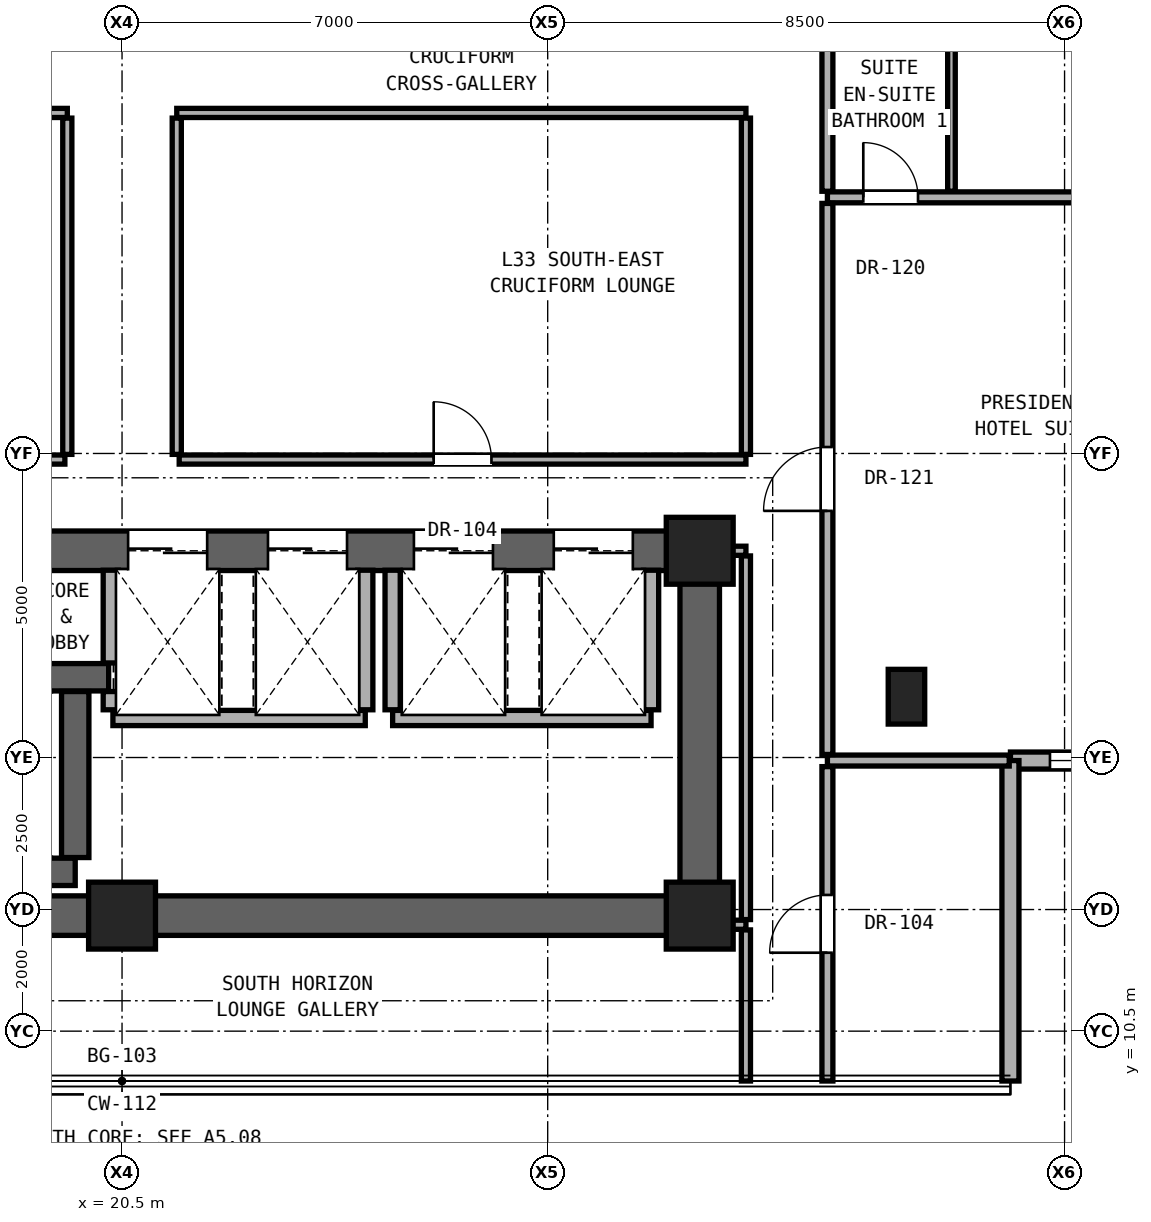
"""IFC4 building model, lengths in metres.
Left out: names, types, materials, properties, quantities, classifications, styles, units other than length and angle.
Written with IfcOpenShell. Run it as: python <this file> out.ifc"""

import sys

from ifc_helpers import new_model, si_unit, direction, frame, frame_2d, origin, origin_2d, place, context, subcontext, project, spatial, rectangle, extrude, element, fill, save


model = new_model("IFC4")
c1 = context("Model", 3, precision=1e-05, world=origin(), true_north=direction((0.0, 1.0)))
c2 = subcontext(c1, "Body", "Model", "MODEL_VIEW")
j1 = project(units=[si_unit("LENGTHUNIT", "METRE"), si_unit("PLANEANGLEUNIT", "RADIAN")], contexts=[c1])
p1 = place(None, origin())
s1 = spatial("IfcSite", under=j1, at=p1, CompositionType="ELEMENT")
p2 = place(p1, origin())
s2 = spatial("IfcBuilding", under=s1, at=p2, CompositionType="ELEMENT")
p3 = place(p2, frame((0.0, 0.0, 118.1)))
s3 = spatial("IfcBuildingStorey", under=s2, at=p3, CompositionType="ELEMENT", Elevation=118.1)
for number, where, z_axis, x_axis in (
    (1, (20.5, 12.4, 0.0), (0.0, 0.0, 1.0), (1.0, 0.0, 0.0)),
    (2, (30.0, 12.4, 0.0), (0.0, 0.0, 1.0), (1.0, 0.0, 0.0)),
    (3, (30.0, 18.4, 0.0), (0.0, 0.0, 1.0), (1.0, 0.0, 0.0)),
):
    element("IfcColumn", number, at=place(p3, frame(where, z_axis=z_axis, x_axis=x_axis)), inside=s3, PredefinedType="COLUMN", context=c2, shape_type="SweptSolid", body=[
        extrude(rectangle(XDim=1.1, YDim=1.1, at=origin_2d()), origin(), (0.0, 0.0, 1.0), 3.3),
    ])
p4 = place(p3, frame((33.4, 16.0, 0.0), z_axis=(0.0, 0.0, 1.0), x_axis=(1.0, 0.0, 0.0)))
e4 = element("IfcColumn", 4, at=p4, inside=s3, PredefinedType="PILASTER", context=c2, shape_type="SweptSolid", body=[
    extrude(rectangle(XDim=0.6, YDim=0.9, at=origin_2d()), origin(), (0.0, 0.0, 1.0), 3.3),
])
p5 = place(p3, frame((11.0, 12.4, 0.0), z_axis=(0.0, 0.0, 1.0), x_axis=(1.0, 0.0, 0.0)))
e5 = element("IfcWall", 5, at=p5, inside=s3, PredefinedType="SHEAR", context=c2, shape_type="SweptSolid", body=[
    extrude(rectangle(XDim=19.0, YDim=0.65, at=frame_2d((9.5, 0.0))), origin(), (0.0, 0.0, 1.0), 3.08),
])
p6 = place(p3, frame((30.0, 12.4, 0.0), z_axis=(0.0, 0.0, 1.0), x_axis=(0.0, 1.0, 0.0)))
e6 = element("IfcWall", 6, at=p6, inside=s3, PredefinedType="SHEAR", context=c2, shape_type="SweptSolid", body=[
    extrude(rectangle(XDim=6.0, YDim=0.65, at=frame_2d((3.0, 0.0))), origin(), (0.0, 0.0, 1.0), 3.08),
])
p7 = place(p3, frame((11.0, 18.4, 0.0), z_axis=(0.0, 0.0, 1.0), x_axis=(1.0, 0.0, 0.0)))
e7 = element("IfcWall", 7, at=p7, inside=s3, PredefinedType="SHEAR", context=c2, shape_type="SweptSolid", body=[
    extrude(rectangle(XDim=19.0, YDim=0.65, at=frame_2d((9.5, 0.0))), origin(), (0.0, 0.0, 1.0), 3.08),
])
p8 = place(p7, frame((4.175, 0.0, 0.0)))
e8 = element("IfcOpeningElement", 8, at=p8, cuts=e7, PredefinedType="OPENING", context=c2, shape_type="SweptSolid", body=[
    extrude(rectangle(XDim=1.2, YDim=2.25, at=frame_2d((0.6, 1.125))), frame((0.0, 0.335, 0.0), z_axis=(0.0, -1.0, 0.0), x_axis=(1.0, 0.0, 0.0)), (0.0, 0.0, 1.0), 0.67),
])
p9 = place(p7, frame((9.6, 0.0, 0.0)))
e9 = element("IfcOpeningElement", 9, at=p9, cuts=e7, PredefinedType="OPENING", context=c2, shape_type="SweptSolid", body=[
    extrude(rectangle(XDim=1.3, YDim=2.3, at=frame_2d((0.65, 1.15))), frame((0.0, 0.335, 0.0), z_axis=(0.0, -1.0, 0.0), x_axis=(1.0, 0.0, 0.0)), (0.0, 0.0, 1.0), 0.67),
])
p10 = place(p7, frame((11.9, 0.0, 0.0)))
e10 = element("IfcOpeningElement", 10, at=p10, cuts=e7, PredefinedType="OPENING", context=c2, shape_type="SweptSolid", body=[
    extrude(rectangle(XDim=1.3, YDim=2.3, at=frame_2d((0.65, 1.15))), frame((0.0, 0.335, 0.0), z_axis=(0.0, -1.0, 0.0), x_axis=(1.0, 0.0, 0.0)), (0.0, 0.0, 1.0), 0.67),
])
p11 = place(p7, frame((14.3, 0.0, 0.0)))
e11 = element("IfcOpeningElement", 11, at=p11, cuts=e7, PredefinedType="OPENING", context=c2, shape_type="SweptSolid", body=[
    extrude(rectangle(XDim=1.3, YDim=2.3, at=frame_2d((0.65, 1.15))), frame((0.0, 0.335, 0.0), z_axis=(0.0, -1.0, 0.0), x_axis=(1.0, 0.0, 0.0)), (0.0, 0.0, 1.0), 0.67),
])
p12 = place(p7, frame((16.6, 0.0, 0.0)))
e12 = element("IfcOpeningElement", 12, at=p12, cuts=e7, PredefinedType="OPENING", context=c2, shape_type="SweptSolid", body=[
    extrude(rectangle(XDim=1.3, YDim=2.3, at=frame_2d((0.65, 1.15))), frame((0.0, 0.335, 0.0), z_axis=(0.0, -1.0, 0.0), x_axis=(1.0, 0.0, 0.0)), (0.0, 0.0, 1.0), 0.67),
])
p13 = place(p3, frame((35.11, 14.95, 0.0), z_axis=(0.0, 0.0, 1.0), x_axis=(1.0, 0.0, 0.0)))
e13 = element("IfcWall", 13, at=p13, inside=s3, PredefinedType="SOLIDWALL", context=c2, shape_type="SweptSolid", body=[
    extrude(rectangle(XDim=5.27, YDim=0.28, at=frame_2d((2.635, 0.0))), origin(), (0.0, 0.0, 1.0), 3.06),
])
p14 = place(p13, frame((0.65, 0.0, 0.85)))
e14 = element("IfcOpeningElement", 14, at=p14, cuts=e13, PredefinedType="OPENING", context=c2, shape_type="SweptSolid", body=[
    extrude(rectangle(XDim=1.1, YDim=2.0, at=frame_2d((0.55, 1.0))), frame((0.0, 0.15, 0.0), z_axis=(0.0, -1.0, 0.0), x_axis=(1.0, 0.0, 0.0)), (0.0, 0.0, 1.0), 0.3),
])
p15 = place(p3, frame((35.11, 9.68, 0.0), z_axis=(0.0, 0.0, 1.0), x_axis=(0.0, 1.0, 0.0)))
e15 = element("IfcWall", 15, at=p15, inside=s3, PredefinedType="SOLIDWALL", context=c2, shape_type="SweptSolid", body=[
    extrude(rectangle(XDim=5.27, YDim=0.28, at=frame_2d((2.635, 0.0))), origin(), (0.0, 0.0, 1.0), 3.06),
])
p16 = place(p3, frame((30.32, 12.25, 0.0), z_axis=(0.0, 0.0, 1.0), x_axis=(1.0, 0.0, 0.0)))
e16 = element("IfcWall", 16, at=p16, inside=s3, PredefinedType="PARTITIONING", context=c2, shape_type="SweptSolid", body=[
    extrude(rectangle(XDim=0.44, YDim=0.15, at=frame_2d((0.22, 0.0))), origin(), (0.0, 0.0, 1.0), 3.08),
])
p17 = place(p3, frame((11.32, 13.12, 0.0), z_axis=(0.0, 0.0, 1.0), x_axis=(1.0, 0.0, 0.0)))
e17 = element("IfcWall", 17, at=p17, inside=s3, PredefinedType="SHEAR", context=c2, shape_type="SweptSolid", body=[
    extrude(rectangle(XDim=8.41, YDim=0.45, at=frame_2d((4.205, 0.0))), origin(), (0.0, 0.0, 1.0), 3.08),
])
p18 = place(p3, frame((32.1, 14.95, 0.0), z_axis=(0.0, 0.0, 1.0), x_axis=(1.0, 0.0, 0.0)))
e18 = element("IfcWall", 18, at=p18, inside=s3, PredefinedType="PARTITIONING", context=c2, shape_type="SweptSolid", body=[
    extrude(rectangle(XDim=2.99, YDim=0.18, at=frame_2d((1.495, 0.0))), origin(), (0.0, 0.0, 1.0), 3.08),
])
p19 = place(p3, frame((20.35, 15.65, 0.0), z_axis=(0.0, 0.0, 1.0), x_axis=(1.0, 0.0, 0.0)))
e19 = element("IfcWall", 19, at=p19, inside=s3, PredefinedType="SOLIDWALL", context=c2, shape_type="SweptSolid", body=[
    extrude(rectangle(XDim=4.15, YDim=0.25, at=frame_2d((2.075, 0.0))), origin(), (0.0, 0.0, 1.0), 3.08),
])
p20 = place(p3, frame((24.95, 15.65, 0.0), z_axis=(0.0, 0.0, 1.0), x_axis=(1.0, 0.0, 0.0)))
e20 = element("IfcWall", 20, at=p20, inside=s3, PredefinedType="SOLIDWALL", context=c2, shape_type="SweptSolid", body=[
    extrude(rectangle(XDim=4.25, YDim=0.25, at=frame_2d((2.125, 0.0))), origin(), (0.0, 0.0, 1.0), 3.08),
])
p21 = place(p3, frame((11.32, 16.32, 0.0), z_axis=(0.0, 0.0, 1.0), x_axis=(1.0, 0.0, 0.0)))
e21 = element("IfcWall", 21, at=p21, inside=s3, PredefinedType="SHEAR", context=c2, shape_type="SweptSolid", body=[
    extrude(rectangle(XDim=8.96, YDim=0.45, at=frame_2d((4.48, 0.0))), origin(), (0.0, 0.0, 1.0), 3.08),
])
p22 = place(p21, frame((0.495, 0.0, 0.0)))
e22 = element("IfcOpeningElement", 22, at=p22, cuts=e21, PredefinedType="OPENING", context=c2, shape_type="SweptSolid", body=[
    extrude(rectangle(XDim=1.15, YDim=2.2, at=frame_2d((0.575, 1.1))), frame((0.0, 0.235, 0.0), z_axis=(0.0, -1.0, 0.0), x_axis=(1.0, 0.0, 0.0)), (0.0, 0.0, 1.0), 0.47),
])
p23 = place(p3, frame((30.32, 18.4, 0.0), z_axis=(0.0, 0.0, 1.0), x_axis=(1.0, 0.0, 0.0)))
e23 = element("IfcWall", 23, at=p23, inside=s3, PredefinedType="PARTITIONING", context=c2, shape_type="SweptSolid", body=[
    extrude(rectangle(XDim=0.44, YDim=0.15, at=frame_2d((0.22, 0.0))), origin(), (0.0, 0.0, 1.0), 2.456),
])
p24 = place(p3, frame((10.22, 19.9, 0.0), z_axis=(0.0, 0.0, 1.0), x_axis=(1.0, 0.0, 0.0)))
e24 = element("IfcWall", 24, at=p24, inside=s3, PredefinedType="PARTITIONING", context=c2, shape_type="SweptSolid", body=[
    extrude(rectangle(XDim=9.34, YDim=0.15, at=frame_2d((4.67, 0.0))), origin(), (0.0, 0.0, 1.0), 2.216),
])
p25 = place(p24, frame((1.66, 0.0, 0.0)))
e25 = element("IfcOpeningElement", 25, at=p25, cuts=e24, PredefinedType="OPENING", context=c2, shape_type="SweptSolid", body=[
    extrude(rectangle(XDim=0.9, YDim=2.1, at=frame_2d((0.45, 1.05))), frame((0.0, 0.085, 0.0), z_axis=(0.0, -1.0, 0.0), x_axis=(1.0, 0.0, 0.0)), (0.0, 0.0, 1.0), 0.17),
])
p26 = place(p24, frame((5.665, 0.0, 0.0)))
e26 = element("IfcOpeningElement", 26, at=p26, cuts=e24, PredefinedType="OPENING", context=c2, shape_type="SweptSolid", body=[
    extrude(rectangle(XDim=0.95, YDim=2.15, at=frame_2d((0.475, 1.075))), frame((0.0, 0.085, 0.0), z_axis=(0.0, -1.0, 0.0), x_axis=(1.0, 0.0, 0.0)), (0.0, 0.0, 1.0), 0.17),
])
p27 = place(p3, frame((21.44, 19.9, 0.0), z_axis=(0.0, 0.0, 1.0), x_axis=(1.0, 0.0, 0.0)))
e27 = element("IfcWall", 27, at=p27, inside=s3, PredefinedType="PARTITIONING", context=c2, shape_type="SweptSolid", body=[
    extrude(rectangle(XDim=9.32, YDim=0.15, at=frame_2d((4.66, 0.0))), origin(), (0.0, 0.0, 1.0), 2.216),
])
p28 = place(p27, frame((4.185, 0.0, 0.0)))
e28 = element("IfcOpeningElement", 28, at=p28, cuts=e27, PredefinedType="OPENING", context=c2, shape_type="SweptSolid", body=[
    extrude(rectangle(XDim=0.95, YDim=2.15, at=frame_2d((0.475, 1.075))), frame((0.0, 0.085, 0.0), z_axis=(0.0, -1.0, 0.0), x_axis=(1.0, 0.0, 0.0)), (0.0, 0.0, 1.0), 0.17),
])
p29 = place(p3, frame((32.1, 24.212, 0.0), z_axis=(0.0, 0.0, 1.0), x_axis=(1.0, 0.0, 0.0)))
e29 = element("IfcWall", 29, at=p29, inside=s3, PredefinedType="PARTITIONING", context=c2, shape_type="SweptSolid", body=[
    extrude(rectangle(XDim=8.28, YDim=0.18, at=frame_2d((4.14, 0.0))), origin(), (0.0, 0.0, 1.0), 2.299),
])
p30 = place(p29, frame((4.665, 0.0, 0.0)))
e30 = element("IfcOpeningElement", 30, at=p30, cuts=e29, PredefinedType="OPENING", context=c2, shape_type="SweptSolid", body=[
    extrude(rectangle(XDim=0.95, YDim=2.15, at=frame_2d((0.475, 1.075))), frame((0.0, 0.1, 0.0), z_axis=(0.0, -1.0, 0.0), x_axis=(1.0, 0.0, 0.0)), (0.0, 0.0, 1.0), 0.2),
])
p31 = place(p29, frame((0.59, 0.0, 0.0)))
e31 = element("IfcOpeningElement", 31, at=p31, cuts=e29, PredefinedType="OPENING", context=c2, shape_type="SweptSolid", body=[
    extrude(rectangle(XDim=0.9, YDim=2.1, at=frame_2d((0.45, 1.05))), frame((0.0, 0.1, 0.0), z_axis=(0.0, -1.0, 0.0), x_axis=(1.0, 0.0, 0.0)), (0.0, 0.0, 1.0), 0.2),
])
for number, where, z_axis, x_axis in (
    (32, (10.24, 25.6, 0.0), (0.0, 0.0, 1.0), (1.0, 0.0, 0.0)),
    (33, (21.4, 25.6, 0.0), (0.0, 0.0, 1.0), (1.0, 0.0, 0.0)),
):
    element("IfcWall", number, at=place(p3, frame(where, z_axis=z_axis, x_axis=x_axis)), inside=s3, PredefinedType="PARTITIONING", context=c2, shape_type="SweptSolid", body=[
        extrude(rectangle(XDim=9.36, YDim=0.15, at=frame_2d((4.68, 0.0))), origin(), (0.0, 0.0, 1.0), 2.216),
    ])
p32 = place(p3, frame((19.6, 19.985, 0.0), z_axis=(0.0, 0.0, 1.0), x_axis=(0.0, 1.0, 0.0)))
e34 = element("IfcWall", 34, at=p32, inside=s3, PredefinedType="PARTITIONING", context=c2, shape_type="SweptSolid", body=[
    extrude(rectangle(XDim=5.53, YDim=0.15, at=frame_2d((2.765, 0.0))), origin(), (0.0, 0.0, 1.0), 2.216),
])
p33 = place(p3, frame((19.73, 13.355, 0.0), z_axis=(0.0, 0.0, 1.0), x_axis=(0.0, 1.0, 0.0)))
e35 = element("IfcWall", 35, at=p33, inside=s3, PredefinedType="SHEAR", context=c2, shape_type="SweptSolid", body=[
    extrude(rectangle(XDim=2.73, YDim=0.45, at=frame_2d((1.365, 0.0))), origin(), (0.0, 0.0, 1.0), 3.08),
])
p34 = place(p3, frame((20.315, 15.785, 0.0), z_axis=(0.0, 0.0, 1.0), x_axis=(0.0, 1.0, 0.0)))
e36 = element("IfcWall", 36, at=p34, inside=s3, PredefinedType="SOLIDWALL", context=c2, shape_type="SweptSolid", body=[
    extrude(rectangle(XDim=0.3, YDim=0.25, at=frame_2d((0.15, 0.0))), origin(), (0.0, 0.0, 1.0), 3.08),
])
p35 = place(p3, frame((20.315, 16.555, 0.0), z_axis=(0.0, 0.0, 1.0), x_axis=(0.0, 1.0, 0.0)))
e37 = element("IfcWall", 37, at=p35, inside=s3, PredefinedType="SOLIDWALL", context=c2, shape_type="SweptSolid", body=[
    extrude(rectangle(XDim=1.525, YDim=0.25, at=frame_2d((0.763, 0.0))), origin(), (0.0, 0.0, 1.0), 3.08),
])
p36 = place(p3, frame((21.4, 19.985, 0.0), z_axis=(0.0, 0.0, 1.0), x_axis=(0.0, 1.0, 0.0)))
e38 = element("IfcWall", 38, at=p36, inside=s3, PredefinedType="PARTITIONING", context=c2, shape_type="SweptSolid", body=[
    extrude(rectangle(XDim=5.53, YDim=0.15, at=frame_2d((2.765, 0.0))), origin(), (0.0, 0.0, 1.0), 2.216),
])
for number, where, z_axis, x_axis in (
    (39, (24.5, 15.785, 0.0), (0.0, 0.0, 1.0), (0.0, 1.0, 0.0)),
    (40, (24.95, 15.785, 0.0), (0.0, 0.0, 1.0), (0.0, 1.0, 0.0)),
    (41, (29.2, 15.785, 0.0), (0.0, 0.0, 1.0), (0.0, 1.0, 0.0)),
):
    element("IfcWall", number, at=place(p3, frame(where, z_axis=z_axis, x_axis=x_axis)), inside=s3, PredefinedType="SOLIDWALL", context=c2, shape_type="SweptSolid", body=[
        extrude(rectangle(XDim=2.295, YDim=0.25, at=frame_2d((1.147, 0.0))), origin(), (0.0, 0.0, 1.0), 3.08),
    ])
p37 = place(p3, frame((30.76, 9.68, 0.0), z_axis=(0.0, 0.0, 1.0), x_axis=(0.0, 1.0, 0.0)))
e42 = element("IfcWall", 42, at=p37, inside=s3, PredefinedType="PARTITIONING", context=c2, shape_type="SweptSolid", body=[
    extrude(rectangle(XDim=2.485, YDim=0.15, at=frame_2d((1.243, 0.0))), origin(), (0.0, 0.0, 1.0), 3.08),
])
p38 = place(p3, frame((30.76, 12.335, 0.0), z_axis=(0.0, 0.0, 1.0), x_axis=(0.0, 1.0, 0.0)))
e43 = element("IfcWall", 43, at=p38, inside=s3, PredefinedType="PARTITIONING", context=c2, shape_type="SweptSolid", body=[
    extrude(rectangle(XDim=5.98, YDim=0.15, at=frame_2d((2.99, 0.0))), origin(), (0.0, 0.0, 1.0), 2.456),
])
p39 = place(p3, frame((30.76, 19.985, 0.0), z_axis=(0.0, 0.0, 1.0), x_axis=(0.0, 1.0, 0.0)))
e44 = element("IfcWall", 44, at=p39, inside=s3, PredefinedType="PARTITIONING", context=c2, shape_type="SweptSolid", body=[
    extrude(rectangle(XDim=5.53, YDim=0.15, at=frame_2d((2.765, 0.0))), origin(), (0.0, 0.0, 1.0), 2.299),
])
p40 = place(p3, frame((32.1, 9.68, 0.0), z_axis=(0.0, 0.0, 1.0), x_axis=(0.0, 1.0, 0.0)))
e45 = element("IfcWall", 45, at=p40, inside=s3, PredefinedType="PARTITIONING", context=c2, shape_type="SweptSolid", body=[
    extrude(rectangle(XDim=5.17, YDim=0.18, at=frame_2d((2.585, 0.0))), origin(), (0.0, 0.0, 1.0), 3.08),
])
p41 = place(p40, frame((2.11, 0.0, 0.0)))
e46 = element("IfcOpeningElement", 46, at=p41, cuts=e45, PredefinedType="OPENING", context=c2, shape_type="SweptSolid", body=[
    extrude(rectangle(XDim=0.95, YDim=2.15, at=frame_2d((0.475, 1.075))), frame((0.0, 0.1, 0.0), z_axis=(0.0, -1.0, 0.0), x_axis=(1.0, 0.0, 0.0)), (0.0, 0.0, 1.0), 0.2),
])
p42 = place(p3, frame((32.1, 15.05, 0.0), z_axis=(0.0, 0.0, 1.0), x_axis=(0.0, 1.0, 0.0)))
e47 = element("IfcWall", 47, at=p42, inside=s3, PredefinedType="PARTITIONING", context=c2, shape_type="SweptSolid", body=[
    extrude(rectangle(XDim=9.062, YDim=0.18, at=frame_2d((4.531, 0.0))), origin(), (0.0, 0.0, 1.0), 2.456),
])
p43 = place(p42, frame((4.006, 0.0, 0.0)))
e48 = element("IfcOpeningElement", 48, at=p43, cuts=e47, PredefinedType="OPENING", context=c2, shape_type="SweptSolid", body=[
    extrude(rectangle(XDim=1.05, YDim=2.2, at=frame_2d((0.525, 1.1))), frame((0.0, 0.1, 0.0), z_axis=(0.0, -1.0, 0.0), x_axis=(1.0, 0.0, 0.0)), (0.0, 0.0, 1.0), 0.2),
])
p44 = place(p3, frame((32.1, 24.312, 0.0), z_axis=(0.0, 0.0, 1.0), x_axis=(0.0, 1.0, 0.0)))
e49 = element("IfcWall", 49, at=p44, inside=s3, PredefinedType="PARTITIONING", context=c2, shape_type="SweptSolid", body=[
    extrude(rectangle(XDim=2.548, YDim=0.18, at=frame_2d((1.274, 0.0))), origin(), (0.0, 0.0, 1.0), 2.299),
])
p45 = place(p3, frame((34.14, 24.312, 0.0), z_axis=(0.0, 0.0, 1.0), x_axis=(0.0, 1.0, 0.0)))
e50 = element("IfcWall", 50, at=p45, inside=s3, PredefinedType="PARTITIONING", context=c2, shape_type="SweptSolid", body=[
    extrude(rectangle(XDim=2.548, YDim=0.125, at=frame_2d((1.274, 0.0))), origin(), (0.0, 0.0, 1.0), 2.299),
])
p46 = place(p14, origin())
e51 = element("IfcWindow", 51, at=p46, inside=s3, PartitioningType="SINGLE_PANEL", PredefinedType="WINDOW", context=c2, shape_type="SweptSolid", body=[
    extrude(rectangle(XDim=1.1, YDim=2.0, at=frame_2d((0.55, 1.0))), frame((0.0, 0.03, 0.0), z_axis=(0.0, -1.0, 0.0), x_axis=(1.0, 0.0, 0.0)), (0.0, 0.0, 1.0), 0.06),
])
fill(e14, e51)
p47 = place(p43, origin())
e52 = element("IfcDoor", 52, at=p47, inside=s3, OperationType="SINGLE_SWING_LEFT", PredefinedType="DOOR", context=c2, shape_type="SweptSolid", body=[
    extrude(rectangle(XDim=1.05, YDim=2.2, at=frame_2d((0.525, 1.1))), frame((0.0, 0.025, 0.0), z_axis=(0.0, -1.0, 0.0), x_axis=(1.0, 0.0, 0.0)), (0.0, 0.0, 1.0), 0.05),
])
fill(e48, e52)
p48 = place(p31, origin())
e53 = element("IfcDoor", 53, at=p48, inside=s3, OperationType="SINGLE_SWING_LEFT", PredefinedType="DOOR", context=c2, shape_type="SweptSolid", body=[
    extrude(rectangle(XDim=0.9, YDim=2.1, at=frame_2d((0.45, 1.05))), frame((0.0, 0.025, 0.0), z_axis=(0.0, -1.0, 0.0), x_axis=(1.0, 0.0, 0.0)), (0.0, 0.0, 1.0), 0.05),
])
fill(e31, e53)
p49 = place(p28, origin())
e54 = element("IfcDoor", 54, at=p49, inside=s3, OperationType="SINGLE_SWING_LEFT", PredefinedType="DOOR", context=c2, shape_type="SweptSolid", body=[
    extrude(rectangle(XDim=0.95, YDim=2.15, at=frame_2d((0.475, 1.075))), frame((0.0, 0.025, 0.0), z_axis=(0.0, -1.0, 0.0), x_axis=(1.0, 0.0, 0.0)), (0.0, 0.0, 1.0), 0.05),
])
fill(e28, e54)
p50 = place(p41, origin())
e55 = element("IfcDoor", 55, at=p50, inside=s3, OperationType="SINGLE_SWING_LEFT", PredefinedType="DOOR", context=c2, shape_type="SweptSolid", body=[
    extrude(rectangle(XDim=0.95, YDim=2.15, at=frame_2d((0.475, 1.075))), frame((0.0, 0.025, 0.0), z_axis=(0.0, -1.0, 0.0), x_axis=(1.0, 0.0, 0.0)), (0.0, 0.0, 1.0), 0.05),
])
fill(e46, e55)
p51 = place(p9, origin())
e56 = element("IfcDoor", 56, at=p51, inside=s3, OperationType="DOUBLE_DOOR_SLIDING", PredefinedType="DOOR", context=c2, shape_type="SweptSolid", body=[
    extrude(rectangle(XDim=1.3, YDim=2.3, at=frame_2d((0.65, 1.15))), frame((0.0, 0.025, 0.0), z_axis=(0.0, -1.0, 0.0), x_axis=(1.0, 0.0, 0.0)), (0.0, 0.0, 1.0), 0.05),
])
fill(e9, e56)
p52 = place(p10, origin())
e57 = element("IfcDoor", 57, at=p52, inside=s3, OperationType="DOUBLE_DOOR_SLIDING", PredefinedType="DOOR", context=c2, shape_type="SweptSolid", body=[
    extrude(rectangle(XDim=1.3, YDim=2.3, at=frame_2d((0.65, 1.15))), frame((0.0, 0.025, 0.0), z_axis=(0.0, -1.0, 0.0), x_axis=(1.0, 0.0, 0.0)), (0.0, 0.0, 1.0), 0.05),
])
fill(e10, e57)
p53 = place(p11, origin())
e58 = element("IfcDoor", 58, at=p53, inside=s3, OperationType="DOUBLE_DOOR_SLIDING", PredefinedType="DOOR", context=c2, shape_type="SweptSolid", body=[
    extrude(rectangle(XDim=1.3, YDim=2.3, at=frame_2d((0.65, 1.15))), frame((0.0, 0.025, 0.0), z_axis=(0.0, -1.0, 0.0), x_axis=(1.0, 0.0, 0.0)), (0.0, 0.0, 1.0), 0.05),
])
fill(e11, e58)
p54 = place(p12, origin())
e59 = element("IfcDoor", 59, at=p54, inside=s3, OperationType="DOUBLE_DOOR_SLIDING", PredefinedType="DOOR", context=c2, shape_type="SweptSolid", body=[
    extrude(rectangle(XDim=1.3, YDim=2.3, at=frame_2d((0.65, 1.15))), frame((0.0, 0.025, 0.0), z_axis=(0.0, -1.0, 0.0), x_axis=(1.0, 0.0, 0.0)), (0.0, 0.0, 1.0), 0.05),
])
fill(e12, e59)
save(model, sys.argv[1])
